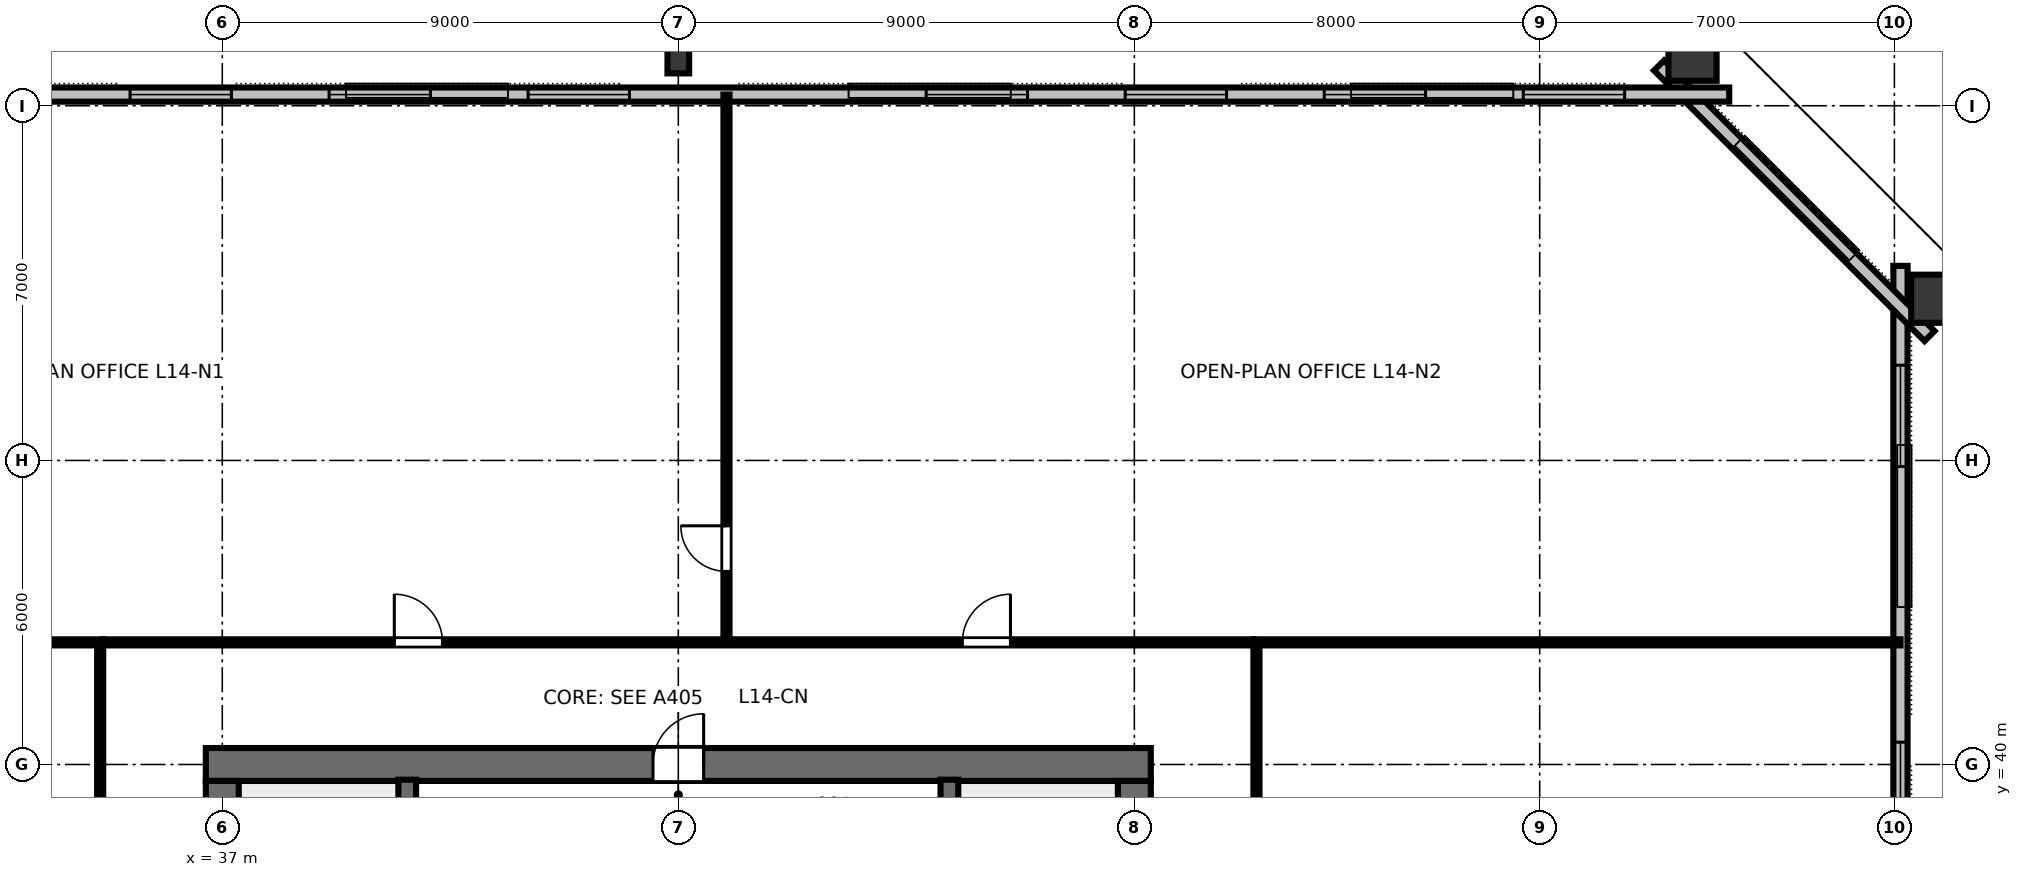
"""IFC4 building model, lengths in metres.
Left out: names, types, materials, properties, quantities, classifications, styles, units other than length and angle.
Written with IfcOpenShell. Run it as: python <this file> out.ifc"""

import sys

from ifc_helpers import new_model, si_unit, direction, frame, frame_2d, origin, origin_2d, place, context, subcontext, project, spatial, rectangle, hollow_rectangle, i_section, extrude, element, fill, save


model = new_model("IFC4")
c1 = context("Model", 3, precision=1e-05, world=origin(), true_north=direction((0.0, 1.0)))
c2 = subcontext(c1, "Body", "Model", "MODEL_VIEW")
j1 = project(units=[si_unit("LENGTHUNIT", "METRE"), si_unit("PLANEANGLEUNIT", "RADIAN")], contexts=[c1])
p1 = place(None, origin())
s1 = spatial("IfcSite", under=j1, at=p1, CompositionType="ELEMENT")
p2 = place(p1, origin())
s2 = spatial("IfcBuilding", under=s1, at=p2, CompositionType="ELEMENT")
p3 = place(p2, frame((0.0, 0.0, 56.8)))
s3 = spatial("IfcBuildingStorey", under=s2, at=p3, CompositionType="ELEMENT", Elevation=56.8)
p4 = place(p3, frame((36.675, 40.0, 0.0), z_axis=(0.0, 0.0, 1.0), x_axis=(1.0, 0.0, 0.0)))
e1 = element("IfcWall", 1, at=p4, inside=s3, PredefinedType="SHEAR", context=c2, shape_type="SweptSolid", body=[
    extrude(rectangle(XDim=18.65, YDim=0.65, at=frame_2d((9.325, 0.0))), origin(), (0.0, 0.0, 1.0), 3.36),
])
p5 = place(p4, frame((8.825, 0.0, 0.0)))
e2 = element("IfcOpeningElement", 2, at=p5, cuts=e1, PredefinedType="OPENING", context=c2, shape_type="SweptSolid", body=[
    extrude(rectangle(XDim=1.0, YDim=2.15, at=frame_2d((0.5, 1.075))), frame((0.0, 0.335, 0.0), z_axis=(0.0, -1.0, 0.0), x_axis=(1.0, 0.0, 0.0)), (0.0, 0.0, 1.0), 0.67),
])
p6 = place(p3, frame((37.0, 24.325, 0.0), z_axis=(0.0, 0.0, 1.0), x_axis=(0.0, 1.0, 0.0)))
e3 = element("IfcWall", 3, at=p6, inside=s3, PredefinedType="SHEAR", context=c2, shape_type="SweptSolid", body=[
    extrude(rectangle(XDim=15.35, YDim=0.65, at=frame_2d((7.675, 0.0))), origin(), (0.0, 0.0, 1.0), 3.36),
])
p7 = place(p6, frame((5.2, 0.0, 0.0)))
e4 = element("IfcOpeningElement", 4, at=p7, cuts=e3, PredefinedType="OPENING", context=c2, shape_type="SweptSolid", body=[
    extrude(rectangle(XDim=1.15, YDim=2.15, at=frame_2d((0.575, 1.075))), frame((0.0, 0.335, 0.0), z_axis=(0.0, -1.0, 0.0), x_axis=(1.0, 0.0, 0.0)), (0.0, 0.0, 1.0), 0.67),
])
p8 = place(p3, frame((55.0, 24.325, 0.0), z_axis=(0.0, 0.0, 1.0), x_axis=(0.0, 1.0, 0.0)))
e5 = element("IfcWall", 5, at=p8, inside=s3, PredefinedType="SHEAR", context=c2, shape_type="SweptSolid", body=[
    extrude(rectangle(XDim=15.35, YDim=0.65, at=frame_2d((7.675, 0.0))), origin(), (0.0, 0.0, 1.0), 3.36),
])
p9 = place(p8, frame((5.2, 0.0, 0.0)))
e6 = element("IfcOpeningElement", 6, at=p9, cuts=e5, PredefinedType="OPENING", context=c2, shape_type="SweptSolid", body=[
    extrude(rectangle(XDim=1.15, YDim=2.15, at=frame_2d((0.575, 1.075))), frame((0.0, 0.335, 0.0), z_axis=(0.0, -1.0, 0.0), x_axis=(1.0, 0.0, 0.0)), (0.0, 0.0, 1.0), 0.67),
])
p10 = place(p3, frame((70.907, 49.191, 0.0), z_axis=(0.103150348316, 0.030287313206, 0.994204548522), x_axis=(-0.953933183148, -0.280096708997, 0.107504956625)))
e7 = element("IfcColumn", 7, at=p10, inside=s3, PredefinedType="COLUMN", context=c2, shape_type="SweptSolid", body=[
    extrude(hollow_rectangle(XDim=0.95, YDim=1.15, WallThickness=0.06, at=origin_2d()), origin(), (0.0, 0.0, 1.0), 3.377),
])
p11 = place(p3, frame((66.016, 54.067, 0.0), z_axis=(0.04485544424, 0.088480981137, 0.995067387215), x_axis=(-0.891933822614, 0.452165960769, 0.0)))
e8 = element("IfcColumn", 8, at=p11, inside=s3, PredefinedType="COLUMN", context=c2, shape_type="SweptSolid", body=[
    extrude(hollow_rectangle(XDim=0.95, YDim=1.15, WallThickness=0.06, at=origin_2d()), origin(), (0.0, 0.0, 1.0), 3.375),
])
p12 = place(p3, frame((46.0, 53.88, 0.0), z_axis=(0.0, 0.089001216718, 0.996031517284), x_axis=(-1.0, 0.0, 0.0)))
e9 = element("IfcColumn", 9, at=p12, inside=s3, PredefinedType="COLUMN", context=c2, shape_type="SweptSolid", body=[
    extrude(i_section(OverallWidth=0.428, OverallDepth=0.483, WebThickness=0.051, FlangeThickness=0.082, FilletRadius=0.025, at=origin_2d()), origin(), (0.0, 0.0, 1.0), 3.371),
])
p13 = place(p3, frame((70.12, 14.16, 0.0), z_axis=(0.0, 0.0, 1.0), x_axis=(0.0, 1.0, 0.0)))
e10 = element("IfcWall", 10, at=p13, inside=s3, PredefinedType="STANDARD", context=c2, shape_type="SweptSolid", body=[
    extrude(rectangle(XDim=35.68, YDim=0.28, at=frame_2d((17.84, 0.0))), origin(), (0.0, 0.0, 1.0), 3.36),
])
p14 = place(p13, frame((1.96, 0.0, 0.8)))
e11 = element("IfcOpeningElement", 11, at=p14, cuts=e10, PredefinedType="OPENING", context=c2, shape_type="SweptSolid", body=[
    extrude(rectangle(XDim=2.0, YDim=1.95, at=frame_2d((1.0, 0.975))), frame((0.0, 0.15, 0.0), z_axis=(0.0, -1.0, 0.0), x_axis=(1.0, 0.0, 0.0)), (0.0, 0.0, 1.0), 0.3),
])
p15 = place(p13, frame((9.4, 0.0, 0.8)))
e12 = element("IfcOpeningElement", 12, at=p15, cuts=e10, PredefinedType="OPENING", context=c2, shape_type="SweptSolid", body=[
    extrude(rectangle(XDim=2.0, YDim=1.95, at=frame_2d((1.0, 0.975))), frame((0.0, 0.15, 0.0), z_axis=(0.0, -1.0, 0.0), x_axis=(1.0, 0.0, 0.0)), (0.0, 0.0, 1.0), 0.3),
])
p16 = place(p13, frame((13.12, 0.0, 0.8)))
e13 = element("IfcOpeningElement", 13, at=p16, cuts=e10, PredefinedType="OPENING", context=c2, shape_type="SweptSolid", body=[
    extrude(rectangle(XDim=2.0, YDim=1.95, at=frame_2d((1.0, 0.975))), frame((0.0, 0.15, 0.0), z_axis=(0.0, -1.0, 0.0), x_axis=(1.0, 0.0, 0.0)), (0.0, 0.0, 1.0), 0.3),
])
p17 = place(p13, frame((20.56, 0.0, 0.8)))
e14 = element("IfcOpeningElement", 14, at=p17, cuts=e10, PredefinedType="OPENING", context=c2, shape_type="SweptSolid", body=[
    extrude(rectangle(XDim=2.0, YDim=1.95, at=frame_2d((1.0, 0.975))), frame((0.0, 0.15, 0.0), z_axis=(0.0, -1.0, 0.0), x_axis=(1.0, 0.0, 0.0)), (0.0, 0.0, 1.0), 0.3),
])
p18 = place(p13, frame((24.28, 0.0, 0.8)))
e15 = element("IfcOpeningElement", 15, at=p18, cuts=e10, PredefinedType="OPENING", context=c2, shape_type="SweptSolid", body=[
    extrude(rectangle(XDim=2.0, YDim=1.95, at=frame_2d((1.0, 0.975))), frame((0.0, 0.15, 0.0), z_axis=(0.0, -1.0, 0.0), x_axis=(1.0, 0.0, 0.0)), (0.0, 0.0, 1.0), 0.3),
])
p19 = place(p13, frame((31.72, 0.0, 0.8)))
e16 = element("IfcOpeningElement", 16, at=p19, cuts=e10, PredefinedType="OPENING", context=c2, shape_type="SweptSolid", body=[
    extrude(rectangle(XDim=2.0, YDim=1.95, at=frame_2d((1.0, 0.975))), frame((0.0, 0.15, 0.0), z_axis=(0.0, -1.0, 0.0), x_axis=(1.0, 0.0, 0.0)), (0.0, 0.0, 1.0), 0.3),
])
p20 = place(p3, frame((70.694, 48.455, 0.0), z_axis=(0.0, 0.0, 1.0), x_axis=(-0.707106781187, 0.707106781187, 0.0)))
e17 = element("IfcWall", 17, at=p20, inside=s3, PredefinedType="STANDARD", context=c2, shape_type="SweptSolid", body=[
    extrude(rectangle(XDim=7.551, YDim=0.28, at=frame_2d((3.775, 0.0))), origin(), (0.0, 0.0, 1.0), 3.36),
])
p21 = place(p3, frame((66.74, 53.22, 0.0), z_axis=(0.0, 0.0, 1.0), x_axis=(-1.0, 0.0, 0.0)))
e18 = element("IfcWall", 18, at=p21, inside=s3, PredefinedType="STANDARD", context=c2, shape_type="SweptSolid", body=[
    extrude(rectangle(XDim=41.48, YDim=0.28, at=frame_2d((20.74, 0.0))), origin(), (0.0, 0.0, 1.0), 3.36),
])
p22 = place(p21, frame((2.064, 0.0, 0.8)))
e19 = element("IfcOpeningElement", 19, at=p22, cuts=e18, PredefinedType="OPENING", context=c2, shape_type="SweptSolid", body=[
    extrude(rectangle(XDim=2.0, YDim=1.95, at=frame_2d((1.0, 0.975))), frame((0.0, 0.15, 0.0), z_axis=(0.0, -1.0, 0.0), x_axis=(1.0, 0.0, 0.0)), (0.0, 0.0, 1.0), 0.3),
])
p23 = place(p21, frame((5.992, 0.0, 0.8)))
e20 = element("IfcOpeningElement", 20, at=p23, cuts=e18, PredefinedType="OPENING", context=c2, shape_type="SweptSolid", body=[
    extrude(rectangle(XDim=2.0, YDim=1.95, at=frame_2d((1.0, 0.975))), frame((0.0, 0.15, 0.0), z_axis=(0.0, -1.0, 0.0), x_axis=(1.0, 0.0, 0.0)), (0.0, 0.0, 1.0), 0.3),
])
p24 = place(p21, frame((9.92, 0.0, 0.8)))
e21 = element("IfcOpeningElement", 21, at=p24, cuts=e18, PredefinedType="OPENING", context=c2, shape_type="SweptSolid", body=[
    extrude(rectangle(XDim=2.0, YDim=1.95, at=frame_2d((1.0, 0.975))), frame((0.0, 0.15, 0.0), z_axis=(0.0, -1.0, 0.0), x_axis=(1.0, 0.0, 0.0)), (0.0, 0.0, 1.0), 0.3),
])
p25 = place(p21, frame((13.848, 0.0, 0.8)))
e22 = element("IfcOpeningElement", 22, at=p25, cuts=e18, PredefinedType="OPENING", context=c2, shape_type="SweptSolid", body=[
    extrude(rectangle(XDim=2.0, YDim=1.95, at=frame_2d((1.0, 0.975))), frame((0.0, 0.15, 0.0), z_axis=(0.0, -1.0, 0.0), x_axis=(1.0, 0.0, 0.0)), (0.0, 0.0, 1.0), 0.3),
])
p26 = place(p21, frame((21.704, 0.0, 0.8)))
e23 = element("IfcOpeningElement", 23, at=p26, cuts=e18, PredefinedType="OPENING", context=c2, shape_type="SweptSolid", body=[
    extrude(rectangle(XDim=2.0, YDim=1.95, at=frame_2d((1.0, 0.975))), frame((0.0, 0.15, 0.0), z_axis=(0.0, -1.0, 0.0), x_axis=(1.0, 0.0, 0.0)), (0.0, 0.0, 1.0), 0.3),
])
p27 = place(p21, frame((25.632, 0.0, 0.8)))
e24 = element("IfcOpeningElement", 24, at=p27, cuts=e18, PredefinedType="OPENING", context=c2, shape_type="SweptSolid", body=[
    extrude(rectangle(XDim=2.0, YDim=1.95, at=frame_2d((1.0, 0.975))), frame((0.0, 0.15, 0.0), z_axis=(0.0, -1.0, 0.0), x_axis=(1.0, 0.0, 0.0)), (0.0, 0.0, 1.0), 0.3),
])
p28 = place(p21, frame((29.56, 0.0, 0.8)))
e25 = element("IfcOpeningElement", 25, at=p28, cuts=e18, PredefinedType="OPENING", context=c2, shape_type="SweptSolid", body=[
    extrude(rectangle(XDim=2.0, YDim=1.95, at=frame_2d((1.0, 0.975))), frame((0.0, 0.15, 0.0), z_axis=(0.0, -1.0, 0.0), x_axis=(1.0, 0.0, 0.0)), (0.0, 0.0, 1.0), 0.3),
])
p29 = place(p21, frame((33.488, 0.0, 0.8)))
e26 = element("IfcOpeningElement", 26, at=p29, cuts=e18, PredefinedType="OPENING", context=c2, shape_type="SweptSolid", body=[
    extrude(rectangle(XDim=2.0, YDim=1.95, at=frame_2d((1.0, 0.975))), frame((0.0, 0.15, 0.0), z_axis=(0.0, -1.0, 0.0), x_axis=(1.0, 0.0, 0.0)), (0.0, 0.0, 1.0), 0.3),
])
p30 = place(p21, frame((37.416, 0.0, 0.8)))
e27 = element("IfcOpeningElement", 27, at=p30, cuts=e18, PredefinedType="OPENING", context=c2, shape_type="SweptSolid", body=[
    extrude(rectangle(XDim=2.0, YDim=1.95, at=frame_2d((1.0, 0.975))), frame((0.0, 0.15, 0.0), z_axis=(0.0, -1.0, 0.0), x_axis=(1.0, 0.0, 0.0)), (0.0, 0.0, 1.0), 0.3),
])
for number, where, z_axis, x_axis in (
    (28, (40.65, 32.0, 0.0), (0.0, 0.0, 1.0), (0.0, 1.0, 0.0)),
    (29, (51.35, 32.0, 0.0), (0.0, 0.0, 1.0), (0.0, 1.0, 0.0)),
):
    element("IfcWall", number, at=place(p3, frame(where, z_axis=z_axis, x_axis=x_axis)), inside=s3, PredefinedType="SHEAR", context=c2, shape_type="SweptSolid", body=[
        extrude(rectangle(XDim=7.7, YDim=0.35, at=frame_2d((3.85, 0.0))), origin(), (0.0, 0.0, 1.0), 3.6),
    ])
p31 = place(p3, frame((46.95, 42.41, 0.0), z_axis=(0.0, 0.0, 1.0), x_axis=(0.0, 1.0, 0.0)))
e30 = element("IfcWall", 30, at=p31, inside=s3, PredefinedType="PARTITIONING", context=c2, shape_type="SweptSolid", body=[
    extrude(rectangle(XDim=10.81, YDim=0.12, at=frame_2d((5.405, 0.0))), origin(), (0.0, 0.0, 1.0), 2.64),
])
p32 = place(p31, frame((1.4, 0.0, 0.0)))
e31 = element("IfcOpeningElement", 31, at=p32, cuts=e30, PredefinedType="OPENING", context=c2, shape_type="SweptSolid", body=[
    extrude(rectangle(XDim=0.9, YDim=2.15, at=frame_2d((0.45, 1.075))), frame((0.0, 0.07, 0.0), z_axis=(0.0, -1.0, 0.0), x_axis=(1.0, 0.0, 0.0)), (0.0, 0.0, 1.0), 0.14),
])
p33 = place(p3, frame((34.65, 42.41, 0.0), z_axis=(0.0, 0.0, 1.0), x_axis=(1.0, 0.0, 0.0)))
e32 = element("IfcWall", 32, at=p33, inside=s3, PredefinedType="PARTITIONING", context=c2, shape_type="SweptSolid", body=[
    extrude(rectangle(XDim=22.7, YDim=0.12, at=frame_2d((11.35, 0.0))), origin(), (0.0, 0.0, 1.0), 2.64),
])
p34 = place(p33, frame((5.745, 0.0, 0.0)))
e33 = element("IfcOpeningElement", 33, at=p34, cuts=e32, PredefinedType="OPENING", context=c2, shape_type="SweptSolid", body=[
    extrude(rectangle(XDim=0.95, YDim=2.15, at=frame_2d((0.475, 1.075))), frame((0.0, 0.07, 0.0), z_axis=(0.0, -1.0, 0.0), x_axis=(1.0, 0.0, 0.0)), (0.0, 0.0, 1.0), 0.14),
])
p35 = place(p33, frame((16.955, 0.0, 0.0)))
e34 = element("IfcOpeningElement", 34, at=p35, cuts=e32, PredefinedType="OPENING", context=c2, shape_type="SweptSolid", body=[
    extrude(rectangle(XDim=0.95, YDim=2.15, at=frame_2d((0.475, 1.075))), frame((0.0, 0.07, 0.0), z_axis=(0.0, -1.0, 0.0), x_axis=(1.0, 0.0, 0.0)), (0.0, 0.0, 1.0), 0.14),
])
p36 = place(p3, frame((34.59, 21.65, 0.0), z_axis=(0.0, 0.0, 1.0), x_axis=(0.0, 1.0, 0.0)))
e35 = element("IfcWall", 35, at=p36, inside=s3, PredefinedType="PARTITIONING", context=c2, shape_type="SweptSolid", body=[
    extrude(rectangle(XDim=20.7, YDim=0.12, at=frame_2d((10.35, 0.0))), origin(), (0.0, 0.0, 1.0), 2.64),
])
p37 = place(p36, frame((9.875, 0.0, 0.0)))
e36 = element("IfcOpeningElement", 36, at=p37, cuts=e35, PredefinedType="OPENING", context=c2, shape_type="SweptSolid", body=[
    extrude(rectangle(XDim=0.95, YDim=2.15, at=frame_2d((0.475, 1.075))), frame((0.0, 0.07, 0.0), z_axis=(0.0, -1.0, 0.0), x_axis=(1.0, 0.0, 0.0)), (0.0, 0.0, 1.0), 0.14),
])
p38 = place(p3, frame((57.41, 21.65, 0.0), z_axis=(0.0, 0.0, 1.0), x_axis=(0.0, 1.0, 0.0)))
e37 = element("IfcWall", 37, at=p38, inside=s3, PredefinedType="PARTITIONING", context=c2, shape_type="SweptSolid", body=[
    extrude(rectangle(XDim=20.7, YDim=0.12, at=frame_2d((10.35, 0.0))), origin(), (0.0, 0.0, 1.0), 2.64),
])
p39 = place(p38, frame((5.479, 0.0, 0.0)))
e38 = element("IfcOpeningElement", 38, at=p39, cuts=e37, PredefinedType="OPENING", context=c2, shape_type="SweptSolid", body=[
    extrude(rectangle(XDim=0.95, YDim=2.15, at=frame_2d((0.475, 1.075))), frame((0.0, 0.07, 0.0), z_axis=(0.0, -1.0, 0.0), x_axis=(1.0, 0.0, 0.0)), (0.0, 0.0, 1.0), 0.14),
])
p40 = place(p38, frame((15.629, 0.0, 0.0)))
e39 = element("IfcOpeningElement", 39, at=p40, cuts=e37, PredefinedType="OPENING", context=c2, shape_type="SweptSolid", body=[
    extrude(rectangle(XDim=0.95, YDim=2.15, at=frame_2d((0.475, 1.075))), frame((0.0, 0.07, 0.0), z_axis=(0.0, -1.0, 0.0), x_axis=(1.0, 0.0, 0.0)), (0.0, 0.0, 1.0), 0.14),
])
for number, where, z_axis, x_axis in (
    (40, (34.65, 42.41, 0.0), (0.0, 0.0, 1.0), (-1.0, 0.0, 0.0)),
    (41, (57.35, 42.41, 0.0), (0.0, 0.0, 1.0), (1.0, 0.0, 0.0)),
):
    element("IfcWall", number, at=place(p3, frame(where, z_axis=z_axis, x_axis=x_axis)), inside=s3, PredefinedType="PARTITIONING", context=c2, shape_type="SweptSolid", body=[
        extrude(rectangle(XDim=12.77, YDim=0.12, at=frame_2d((6.385, 0.0))), origin(), (0.0, 0.0, 1.0), 2.64),
    ])
p41 = place(p18, origin())
e42 = element("IfcWindow", 42, at=p41, inside=s3, PartitioningType="SINGLE_PANEL", PredefinedType="WINDOW", context=c2, shape_type="SweptSolid", body=[
    extrude(rectangle(XDim=2.0, YDim=1.95, at=frame_2d((1.0, 0.975))), frame((0.0, 0.03, 0.0), z_axis=(0.0, -1.0, 0.0), x_axis=(1.0, 0.0, 0.0)), (0.0, 0.0, 1.0), 0.06),
])
fill(e15, e42)
p42 = place(p19, origin())
e43 = element("IfcWindow", 43, at=p42, inside=s3, PartitioningType="SINGLE_PANEL", PredefinedType="WINDOW", context=c2, shape_type="SweptSolid", body=[
    extrude(rectangle(XDim=2.0, YDim=1.95, at=frame_2d((1.0, 0.975))), frame((0.0, 0.03, 0.0), z_axis=(0.0, -1.0, 0.0), x_axis=(1.0, 0.0, 0.0)), (0.0, 0.0, 1.0), 0.06),
])
fill(e16, e43)
p43 = place(p22, origin())
e44 = element("IfcWindow", 44, at=p43, inside=s3, PartitioningType="SINGLE_PANEL", PredefinedType="WINDOW", context=c2, shape_type="SweptSolid", body=[
    extrude(rectangle(XDim=2.0, YDim=1.95, at=frame_2d((1.0, 0.975))), frame((0.0, 0.03, 0.0), z_axis=(0.0, -1.0, 0.0), x_axis=(1.0, 0.0, 0.0)), (0.0, 0.0, 1.0), 0.06),
])
fill(e19, e44)
p44 = place(p23, origin())
e45 = element("IfcWindow", 45, at=p44, inside=s3, PartitioningType="SINGLE_PANEL", PredefinedType="WINDOW", context=c2, shape_type="SweptSolid", body=[
    extrude(rectangle(XDim=2.0, YDim=1.95, at=frame_2d((1.0, 0.975))), frame((0.0, 0.03, 0.0), z_axis=(0.0, -1.0, 0.0), x_axis=(1.0, 0.0, 0.0)), (0.0, 0.0, 1.0), 0.06),
])
fill(e20, e45)
p45 = place(p24, origin())
e46 = element("IfcWindow", 46, at=p45, inside=s3, PartitioningType="SINGLE_PANEL", PredefinedType="WINDOW", context=c2, shape_type="SweptSolid", body=[
    extrude(rectangle(XDim=2.0, YDim=1.95, at=frame_2d((1.0, 0.975))), frame((0.0, 0.03, 0.0), z_axis=(0.0, -1.0, 0.0), x_axis=(1.0, 0.0, 0.0)), (0.0, 0.0, 1.0), 0.06),
])
fill(e21, e46)
p46 = place(p25, origin())
e47 = element("IfcWindow", 47, at=p46, inside=s3, PartitioningType="SINGLE_PANEL", PredefinedType="WINDOW", context=c2, shape_type="SweptSolid", body=[
    extrude(rectangle(XDim=2.0, YDim=1.95, at=frame_2d((1.0, 0.975))), frame((0.0, 0.03, 0.0), z_axis=(0.0, -1.0, 0.0), x_axis=(1.0, 0.0, 0.0)), (0.0, 0.0, 1.0), 0.06),
])
fill(e22, e47)
p47 = place(p26, origin())
e48 = element("IfcWindow", 48, at=p47, inside=s3, PartitioningType="SINGLE_PANEL", PredefinedType="WINDOW", context=c2, shape_type="SweptSolid", body=[
    extrude(rectangle(XDim=2.0, YDim=1.95, at=frame_2d((1.0, 0.975))), frame((0.0, 0.03, 0.0), z_axis=(0.0, -1.0, 0.0), x_axis=(1.0, 0.0, 0.0)), (0.0, 0.0, 1.0), 0.06),
])
fill(e23, e48)
p48 = place(p27, origin())
e49 = element("IfcWindow", 49, at=p48, inside=s3, PartitioningType="SINGLE_PANEL", PredefinedType="WINDOW", context=c2, shape_type="SweptSolid", body=[
    extrude(rectangle(XDim=2.0, YDim=1.95, at=frame_2d((1.0, 0.975))), frame((0.0, 0.03, 0.0), z_axis=(0.0, -1.0, 0.0), x_axis=(1.0, 0.0, 0.0)), (0.0, 0.0, 1.0), 0.06),
])
fill(e24, e49)
p49 = place(p28, origin())
e50 = element("IfcWindow", 50, at=p49, inside=s3, PartitioningType="SINGLE_PANEL", PredefinedType="WINDOW", context=c2, shape_type="SweptSolid", body=[
    extrude(rectangle(XDim=2.0, YDim=1.95, at=frame_2d((1.0, 0.975))), frame((0.0, 0.03, 0.0), z_axis=(0.0, -1.0, 0.0), x_axis=(1.0, 0.0, 0.0)), (0.0, 0.0, 1.0), 0.06),
])
fill(e25, e50)
p50 = place(p5, origin())
e51 = element("IfcDoor", 51, at=p50, inside=s3, OperationType="SINGLE_SWING_RIGHT", PredefinedType="DOOR", context=c2, shape_type="SweptSolid", body=[
    extrude(rectangle(XDim=1.0, YDim=2.15, at=frame_2d((0.5, 1.075))), frame((0.0, 0.025, 0.0), z_axis=(0.0, -1.0, 0.0), x_axis=(1.0, 0.0, 0.0)), (0.0, 0.0, 1.0), 0.05),
])
fill(e2, e51)
p51 = place(p32, origin())
e52 = element("IfcDoor", 52, at=p51, inside=s3, OperationType="SINGLE_SWING_RIGHT", PredefinedType="DOOR", context=c2, shape_type="SweptSolid", body=[
    extrude(rectangle(XDim=0.9, YDim=2.15, at=frame_2d((0.45, 1.075))), frame((0.0, 0.025, 0.0), z_axis=(0.0, -1.0, 0.0), x_axis=(1.0, 0.0, 0.0)), (0.0, 0.0, 1.0), 0.05),
])
fill(e31, e52)
p52 = place(p34, origin())
e53 = element("IfcDoor", 53, at=p52, inside=s3, OperationType="SINGLE_SWING_LEFT", PredefinedType="DOOR", context=c2, shape_type="SweptSolid", body=[
    extrude(rectangle(XDim=0.95, YDim=2.15, at=frame_2d((0.475, 1.075))), frame((0.0, 0.025, 0.0), z_axis=(0.0, -1.0, 0.0), x_axis=(1.0, 0.0, 0.0)), (0.0, 0.0, 1.0), 0.05),
])
fill(e33, e53)
p53 = place(p35, origin())
e54 = element("IfcDoor", 54, at=p53, inside=s3, OperationType="SINGLE_SWING_RIGHT", PredefinedType="DOOR", context=c2, shape_type="SweptSolid", body=[
    extrude(rectangle(XDim=0.95, YDim=2.15, at=frame_2d((0.475, 1.075))), frame((0.0, 0.025, 0.0), z_axis=(0.0, -1.0, 0.0), x_axis=(1.0, 0.0, 0.0)), (0.0, 0.0, 1.0), 0.05),
])
fill(e34, e54)
save(model, sys.argv[1])
